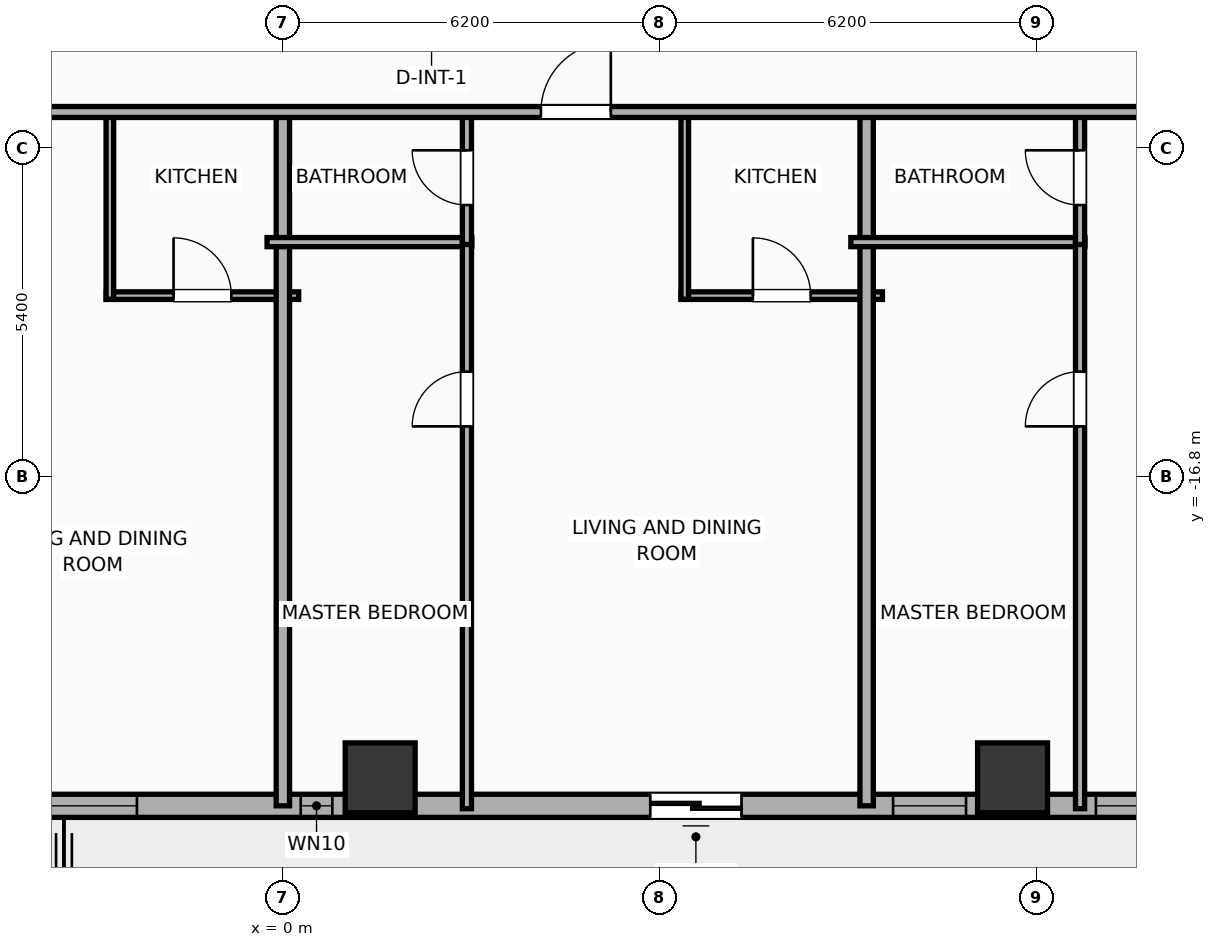
"""IFC4 building model, lengths in metres.
Left out: names, types, materials, properties, quantities, classifications, styles, units other than length and angle.
Written with IfcOpenShell. Run it as: python <this file> out.ifc"""

import sys

from ifc_helpers import new_model, si_unit, direction, frame, frame_2d, origin, origin_2d, place, context, subcontext, project, spatial, rectangle, hollow_rectangle, extrude, element, fill, save


model = new_model("IFC4")
c1 = context("Model", 3, precision=1e-05, world=origin(), true_north=direction((0.0, 1.0)))
c2 = subcontext(c1, "Body", "Model", "MODEL_VIEW")
j1 = project(units=[si_unit("LENGTHUNIT", "METRE"), si_unit("PLANEANGLEUNIT", "RADIAN")], contexts=[c1])
p1 = place(None, origin())
s1 = spatial("IfcSite", under=j1, at=p1, CompositionType="ELEMENT")
p2 = place(p1, origin())
s2 = spatial("IfcBuilding", under=s1, at=p2, CompositionType="ELEMENT")
p3 = place(p2, frame((0.0, 0.0, 53.3)))
s3 = spatial("IfcBuildingStorey", under=s2, at=p3, CompositionType="ELEMENT", Elevation=53.3)
for number, where, z_axis, x_axis in (
    (1, (1.6, -21.75, 0.0), (0.0, 0.0, 1.0), (1.0, 0.0, 0.0)),
    (2, (12.0, -21.75, 0.0), (0.0, 0.0, 1.0), (1.0, 0.0, 0.0)),
):
    element("IfcColumn", number, at=place(p3, frame(where, z_axis=z_axis, x_axis=x_axis)), inside=s3, PredefinedType="COLUMN", context=c2, shape_type="SweptSolid", body=[
        extrude(hollow_rectangle(XDim=1.15, YDim=1.15, WallThickness=0.04, at=origin_2d()), origin(), (0.0, 0.0, 1.0), 3.9),
    ])
p4 = place(p3, frame((22.381, -22.21, 0.0), z_axis=(0.0, 0.0, 1.0), x_axis=(-1.0, 0.0, 0.0)))
e3 = element("IfcWall", 3, at=p4, inside=s3, PredefinedType="ELEMENTEDWALL", context=c2, shape_type="SweptSolid", body=[
    extrude(rectangle(XDim=51.963, YDim=0.38, at=frame_2d((25.981, 0.0))), origin(), (0.0, 0.0, 1.0), 3.65),
])
p5 = place(p4, frame((14.839, 0.0, 0.0)))
e4 = element("IfcOpeningElement", 4, at=p5, cuts=e3, PredefinedType="OPENING", context=c2, shape_type="SweptSolid", body=[
    extrude(rectangle(XDim=1.5, YDim=2.05, at=frame_2d((0.75, 1.025))), frame((0.0, 0.2, 0.0), z_axis=(0.0, -1.0, 0.0), x_axis=(1.0, 0.0, 0.0)), (0.0, 0.0, 1.0), 0.4),
])
p6 = place(p4, frame((6.61, 0.0, 0.75)))
e5 = element("IfcOpeningElement", 5, at=p6, cuts=e3, PredefinedType="OPENING", context=c2, shape_type="SweptSolid", body=[
    extrude(rectangle(XDim=2.4, YDim=2.1, at=frame_2d((1.2, 1.05))), frame((0.0, 0.2, 0.0), z_axis=(0.0, -1.0, 0.0), x_axis=(1.0, 0.0, 0.0)), (0.0, 0.0, 1.0), 0.4),
])
p7 = place(p4, frame((24.781, 0.0, 0.75)))
e6 = element("IfcOpeningElement", 6, at=p7, cuts=e3, PredefinedType="OPENING", context=c2, shape_type="SweptSolid", body=[
    extrude(rectangle(XDim=2.4, YDim=2.1, at=frame_2d((1.2, 1.05))), frame((0.0, 0.2, 0.0), z_axis=(0.0, -1.0, 0.0), x_axis=(1.0, 0.0, 0.0)), (0.0, 0.0, 1.0), 0.4),
])
p8 = place(p4, frame((49.281, 0.0, 0.75)))
e7 = element("IfcOpeningElement", 7, at=p8, cuts=e3, PredefinedType="OPENING", context=c2, shape_type="SweptSolid", body=[
    extrude(rectangle(XDim=1.2, YDim=2.05, at=frame_2d((0.6, 1.025))), frame((0.0, 0.2, 0.0), z_axis=(0.0, -1.0, 0.0), x_axis=(1.0, 0.0, 0.0)), (0.0, 0.0, 1.0), 0.4),
])
p9 = place(p4, frame((46.241, 0.0, 0.75)))
e8 = element("IfcOpeningElement", 8, at=p9, cuts=e3, PredefinedType="OPENING", context=c2, shape_type="SweptSolid", body=[
    extrude(rectangle(XDim=1.2, YDim=2.05, at=frame_2d((0.6, 1.025))), frame((0.0, 0.2, 0.0), z_axis=(0.0, -1.0, 0.0), x_axis=(1.0, 0.0, 0.0)), (0.0, 0.0, 1.0), 0.4),
])
p10 = place(p4, frame((42.686, 0.0, 0.75)))
e9 = element("IfcOpeningElement", 9, at=p10, cuts=e3, PredefinedType="OPENING", context=c2, shape_type="SweptSolid", body=[
    extrude(rectangle(XDim=1.2, YDim=2.05, at=frame_2d((0.6, 1.025))), frame((0.0, 0.2, 0.0), z_axis=(0.0, -1.0, 0.0), x_axis=(1.0, 0.0, 0.0)), (0.0, 0.0, 1.0), 0.4),
])
p11 = place(p4, frame((39.548, 0.0, 0.75)))
e10 = element("IfcOpeningElement", 10, at=p11, cuts=e3, PredefinedType="OPENING", context=c2, shape_type="SweptSolid", body=[
    extrude(rectangle(XDim=1.2, YDim=2.05, at=frame_2d((0.6, 1.025))), frame((0.0, 0.2, 0.0), z_axis=(0.0, -1.0, 0.0), x_axis=(1.0, 0.0, 0.0)), (0.0, 0.0, 1.0), 0.4),
])
p12 = place(p4, frame((34.748, 0.0, 0.75)))
e11 = element("IfcOpeningElement", 11, at=p12, cuts=e3, PredefinedType="OPENING", context=c2, shape_type="SweptSolid", body=[
    extrude(rectangle(XDim=1.2, YDim=2.05, at=frame_2d((0.6, 1.025))), frame((0.0, 0.2, 0.0), z_axis=(0.0, -1.0, 0.0), x_axis=(1.0, 0.0, 0.0)), (0.0, 0.0, 1.0), 0.4),
])
p13 = place(p4, frame((29.226, 0.0, 0.75)))
e12 = element("IfcOpeningElement", 12, at=p13, cuts=e3, PredefinedType="OPENING", context=c2, shape_type="SweptSolid", body=[
    extrude(rectangle(XDim=1.2, YDim=2.05, at=frame_2d((0.6, 1.025))), frame((0.0, 0.2, 0.0), z_axis=(0.0, -1.0, 0.0), x_axis=(1.0, 0.0, 0.0)), (0.0, 0.0, 1.0), 0.4),
])
p14 = place(p4, frame((21.568, 0.0, 0.75)))
e13 = element("IfcOpeningElement", 13, at=p14, cuts=e3, PredefinedType="OPENING", context=c2, shape_type="SweptSolid", body=[
    extrude(rectangle(XDim=0.52, YDim=2.05, at=frame_2d((0.26, 1.025))), frame((0.0, 0.2, 0.0), z_axis=(0.0, -1.0, 0.0), x_axis=(1.0, 0.0, 0.0)), (0.0, 0.0, 1.0), 0.4),
])
p15 = place(p4, frame((11.146, 0.0, 0.75)))
e14 = element("IfcOpeningElement", 14, at=p15, cuts=e3, PredefinedType="OPENING", context=c2, shape_type="SweptSolid", body=[
    extrude(rectangle(XDim=1.2, YDim=2.05, at=frame_2d((0.6, 1.025))), frame((0.0, 0.2, 0.0), z_axis=(0.0, -1.0, 0.0), x_axis=(1.0, 0.0, 0.0)), (0.0, 0.0, 1.0), 0.4),
])
p16 = place(p4, frame((1.436, 0.0, 0.75)))
e15 = element("IfcOpeningElement", 15, at=p16, cuts=e3, PredefinedType="OPENING", context=c2, shape_type="SweptSolid", body=[
    extrude(rectangle(XDim=1.2, YDim=2.05, at=frame_2d((0.6, 1.025))), frame((0.0, 0.2, 0.0), z_axis=(0.0, -1.0, 0.0), x_axis=(1.0, 0.0, 0.0)), (0.0, 0.0, 1.0), 0.4),
])
p17 = place(p3, frame((-2.905, -13.82, 0.0), z_axis=(0.0, 0.0, 1.0), x_axis=(1.0, 0.0, 0.0)))
e16 = element("IfcWall", 16, at=p17, inside=s3, PredefinedType="PARTITIONING", context=c2, shape_type="SweptSolid", body=[
    extrude(rectangle(XDim=3.165, YDim=0.125, at=frame_2d((1.583, 0.0))), origin(), (0.0, 0.0, 1.0), 3.65),
])
p18 = place(p17, frame((1.107, 0.0, 0.0)))
e17 = element("IfcOpeningElement", 17, at=p18, cuts=e16, PredefinedType="OPENING", context=c2, shape_type="SweptSolid", body=[
    extrude(rectangle(XDim=0.95, YDim=2.05, at=frame_2d((0.475, 1.025))), frame((0.0, 0.073, 0.0), z_axis=(0.0, -1.0, 0.0), x_axis=(1.0, 0.0, 0.0)), (0.0, 0.0, 1.0), 0.145),
])
p19 = place(p3, frame((-2.845, -13.88, 0.0), z_axis=(0.0, 0.0, 1.0), x_axis=(0.0, 1.0, 0.0)))
e18 = element("IfcWall", 18, at=p19, inside=s3, PredefinedType="PARTITIONING", context=c2, shape_type="SweptSolid", body=[
    extrude(rectangle(XDim=3.1, YDim=0.125, at=frame_2d((1.55, 0.0))), origin(), (0.0, 0.0, 1.0), 3.65),
])
p20 = place(p3, frame((0.0, -22.21, 0.0), z_axis=(0.0, 0.0, 1.0), x_axis=(0.0, 1.0, 0.0)))
e19 = element("IfcWall", 19, at=p20, inside=s3, PredefinedType="PARTITIONING", context=c2, shape_type="SweptSolid", body=[
    extrude(rectangle(XDim=11.49, YDim=0.22, at=frame_2d((5.745, 0.0))), origin(), (0.0, 0.0, 1.0), 3.65),
])
p21 = place(p3, frame((-0.26, -12.94, 0.0), z_axis=(0.0, 0.0, 1.0), x_axis=(1.0, 0.0, 0.0)))
e20 = element("IfcWall", 20, at=p21, inside=s3, PredefinedType="PLUMBINGWALL", context=c2, shape_type="SweptSolid", body=[
    extrude(rectangle(XDim=3.367, YDim=0.15, at=frame_2d((1.684, 0.0))), origin(), (0.0, 0.0, 1.0), 3.65),
])
p22 = place(p3, frame((3.027, -22.258, 0.0), z_axis=(0.0, 0.0, 1.0), x_axis=(0.0, 1.0, 0.0)))
e21 = element("IfcWall", 21, at=p22, inside=s3, PredefinedType="PLUMBINGWALL", context=c2, shape_type="SweptSolid", body=[
    extrude(rectangle(XDim=9.358, YDim=0.15, at=frame_2d((4.679, 0.0))), origin(), (0.0, 0.0, 1.0), 2.94),
])
p23 = place(p22, frame((6.288, 0.0, 0.0)))
e22 = element("IfcOpeningElement", 22, at=p23, cuts=e21, PredefinedType="OPENING", context=c2, shape_type="SweptSolid", body=[
    extrude(rectangle(XDim=0.9, YDim=2.05, at=frame_2d((0.45, 1.025))), frame((0.0, 0.085, 0.0), z_axis=(0.0, -1.0, 0.0), x_axis=(1.0, 0.0, 0.0)), (0.0, 0.0, 1.0), 0.17),
])
p24 = place(p3, frame((3.027, -12.98, 0.0), z_axis=(0.0, 0.0, 1.0), x_axis=(0.0, 1.0, 0.0)))
e23 = element("IfcWall", 23, at=p24, inside=s3, PredefinedType="PLUMBINGWALL", context=c2, shape_type="SweptSolid", body=[
    extrude(rectangle(XDim=2.2, YDim=0.15, at=frame_2d((1.1, 0.0))), origin(), (0.0, 0.0, 1.0), 2.94),
])
p25 = place(p24, frame((0.65, 0.0, 0.0)))
e24 = element("IfcOpeningElement", 24, at=p25, cuts=e23, PredefinedType="OPENING", context=c2, shape_type="SweptSolid", body=[
    extrude(rectangle(XDim=0.9, YDim=2.05, at=frame_2d((0.45, 1.025))), frame((0.0, 0.085, 0.0), z_axis=(0.0, -1.0, 0.0), x_axis=(1.0, 0.0, 0.0)), (0.0, 0.0, 1.0), 0.17),
])
p26 = place(p3, frame((6.549, -13.82, 0.0), z_axis=(0.0, 0.0, 1.0), x_axis=(1.0, 0.0, 0.0)))
e25 = element("IfcWall", 25, at=p26, inside=s3, PredefinedType="PARTITIONING", context=c2, shape_type="SweptSolid", body=[
    extrude(rectangle(XDim=3.311, YDim=0.125, at=frame_2d((1.656, 0.0))), origin(), (0.0, 0.0, 1.0), 3.65),
])
p27 = place(p26, frame((1.18, 0.0, 0.0)))
e26 = element("IfcOpeningElement", 26, at=p27, cuts=e25, PredefinedType="OPENING", context=c2, shape_type="SweptSolid", body=[
    extrude(rectangle(XDim=0.95, YDim=2.05, at=frame_2d((0.475, 1.025))), frame((0.0, 0.073, 0.0), z_axis=(0.0, -1.0, 0.0), x_axis=(1.0, 0.0, 0.0)), (0.0, 0.0, 1.0), 0.145),
])
p28 = place(p3, frame((6.609, -13.88, 0.0), z_axis=(0.0, 0.0, 1.0), x_axis=(0.0, 1.0, 0.0)))
e27 = element("IfcWall", 27, at=p28, inside=s3, PredefinedType="PARTITIONING", context=c2, shape_type="SweptSolid", body=[
    extrude(rectangle(XDim=3.1, YDim=0.125, at=frame_2d((1.55, 0.0))), origin(), (0.0, 0.0, 1.0), 3.65),
])
p29 = place(p3, frame((9.6, -22.21, 0.0), z_axis=(0.0, 0.0, 1.0), x_axis=(0.0, 1.0, 0.0)))
e28 = element("IfcWall", 28, at=p29, inside=s3, PredefinedType="PARTITIONING", context=c2, shape_type="SweptSolid", body=[
    extrude(rectangle(XDim=11.49, YDim=0.22, at=frame_2d((5.745, 0.0))), origin(), (0.0, 0.0, 1.0), 3.65),
])
p30 = place(p3, frame((9.34, -12.94, 0.0), z_axis=(0.0, 0.0, 1.0), x_axis=(1.0, 0.0, 0.0)))
e29 = element("IfcWall", 29, at=p30, inside=s3, PredefinedType="PLUMBINGWALL", context=c2, shape_type="SweptSolid", body=[
    extrude(rectangle(XDim=3.85, YDim=0.15, at=frame_2d((1.925, 0.0))), origin(), (0.0, 0.0, 1.0), 3.65),
])
p31 = place(p3, frame((13.11, -22.258, 0.0), z_axis=(0.0, 0.0, 1.0), x_axis=(0.0, 1.0, 0.0)))
e30 = element("IfcWall", 30, at=p31, inside=s3, PredefinedType="PLUMBINGWALL", context=c2, shape_type="SweptSolid", body=[
    extrude(rectangle(XDim=9.358, YDim=0.15, at=frame_2d((4.679, 0.0))), origin(), (0.0, 0.0, 1.0), 3.65),
])
p32 = place(p31, frame((6.288, 0.0, 0.0)))
e31 = element("IfcOpeningElement", 31, at=p32, cuts=e30, PredefinedType="OPENING", context=c2, shape_type="SweptSolid", body=[
    extrude(rectangle(XDim=0.9, YDim=2.05, at=frame_2d((0.45, 1.025))), frame((0.0, 0.085, 0.0), z_axis=(0.0, -1.0, 0.0), x_axis=(1.0, 0.0, 0.0)), (0.0, 0.0, 1.0), 0.17),
])
p33 = place(p3, frame((13.11, -12.98, 0.0), z_axis=(0.0, 0.0, 1.0), x_axis=(0.0, 1.0, 0.0)))
e32 = element("IfcWall", 32, at=p33, inside=s3, PredefinedType="PLUMBINGWALL", context=c2, shape_type="SweptSolid", body=[
    extrude(rectangle(XDim=2.2, YDim=0.15, at=frame_2d((1.1, 0.0))), origin(), (0.0, 0.0, 1.0), 3.65),
])
p34 = place(p33, frame((0.65, 0.0, 0.0)))
e33 = element("IfcOpeningElement", 33, at=p34, cuts=e32, PredefinedType="OPENING", context=c2, shape_type="SweptSolid", body=[
    extrude(rectangle(XDim=0.9, YDim=2.05, at=frame_2d((0.45, 1.025))), frame((0.0, 0.085, 0.0), z_axis=(0.0, -1.0, 0.0), x_axis=(1.0, 0.0, 0.0)), (0.0, 0.0, 1.0), 0.17),
])
p35 = place(p3, frame((-33.41, -10.8, 0.0), z_axis=(0.0, 0.0, 1.0), x_axis=(1.0, 0.0, 0.0)))
e34 = element("IfcWall", 34, at=p35, inside=s3, PredefinedType="PARTITIONING", context=c2, shape_type="SweptSolid", body=[
    extrude(rectangle(XDim=59.62, YDim=0.18, at=frame_2d((29.81, 0.0))), origin(), (0.0, 0.0, 1.0), 3.65),
])
p36 = place(p35, frame((3.104, 0.0, 0.0)))
e35 = element("IfcOpeningElement", 35, at=p36, cuts=e34, PredefinedType="OPENING", context=c2, shape_type="SweptSolid", body=[
    extrude(rectangle(XDim=1.15, YDim=2.05, at=frame_2d((0.575, 1.025))), frame((0.0, 0.1, 0.0), z_axis=(0.0, -1.0, 0.0), x_axis=(1.0, 0.0, 0.0)), (0.0, 0.0, 1.0), 0.2),
])
p37 = place(p35, frame((10.246, 0.0, 0.0)))
e36 = element("IfcOpeningElement", 36, at=p37, cuts=e34, PredefinedType="OPENING", context=c2, shape_type="SweptSolid", body=[
    extrude(rectangle(XDim=1.15, YDim=2.05, at=frame_2d((0.575, 1.025))), frame((0.0, 0.1, 0.0), z_axis=(0.0, -1.0, 0.0), x_axis=(1.0, 0.0, 0.0)), (0.0, 0.0, 1.0), 0.2),
])
p38 = place(p35, frame((18.336, 0.0, 0.0)))
e37 = element("IfcOpeningElement", 37, at=p38, cuts=e34, PredefinedType="OPENING", context=c2, shape_type="SweptSolid", body=[
    extrude(rectangle(XDim=1.15, YDim=2.05, at=frame_2d((0.575, 1.025))), frame((0.0, 0.1, 0.0), z_axis=(0.0, -1.0, 0.0), x_axis=(1.0, 0.0, 0.0)), (0.0, 0.0, 1.0), 0.2),
])
p39 = place(p35, frame((28.287, 0.0, 0.0)))
e38 = element("IfcOpeningElement", 38, at=p39, cuts=e34, PredefinedType="OPENING", context=c2, shape_type="SweptSolid", body=[
    extrude(rectangle(XDim=1.15, YDim=2.05, at=frame_2d((0.575, 1.025))), frame((0.0, 0.1, 0.0), z_axis=(0.0, -1.0, 0.0), x_axis=(1.0, 0.0, 0.0)), (0.0, 0.0, 1.0), 0.2),
])
p40 = place(p35, frame((37.653, 0.0, 0.0)))
e39 = element("IfcOpeningElement", 39, at=p40, cuts=e34, PredefinedType="OPENING", context=c2, shape_type="SweptSolid", body=[
    extrude(rectangle(XDim=1.15, YDim=2.05, at=frame_2d((0.575, 1.025))), frame((0.0, 0.1, 0.0), z_axis=(0.0, -1.0, 0.0), x_axis=(1.0, 0.0, 0.0)), (0.0, 0.0, 1.0), 0.2),
])
p41 = place(p35, frame((47.604, 0.0, 0.0)))
e40 = element("IfcOpeningElement", 40, at=p41, cuts=e34, PredefinedType="OPENING", context=c2, shape_type="SweptSolid", body=[
    extrude(rectangle(XDim=1.15, YDim=2.05, at=frame_2d((0.575, 1.025))), frame((0.0, 0.1, 0.0), z_axis=(0.0, -1.0, 0.0), x_axis=(1.0, 0.0, 0.0)), (0.0, 0.0, 1.0), 0.2),
])
p42 = place(p35, frame((55.736, 0.0, 0.0)))
e41 = element("IfcOpeningElement", 41, at=p42, cuts=e34, PredefinedType="OPENING", context=c2, shape_type="SweptSolid", body=[
    extrude(rectangle(XDim=1.15, YDim=2.05, at=frame_2d((0.575, 1.025))), frame((0.0, 0.1, 0.0), z_axis=(0.0, -1.0, 0.0), x_axis=(1.0, 0.0, 0.0)), (0.0, 0.0, 1.0), 0.2),
])
p43 = place(p5, origin())
e42 = element("IfcDoor", 42, at=p43, inside=s3, OperationType="SLIDING_TO_RIGHT", PredefinedType="DOOR", context=c2, shape_type="SweptSolid", body=[
    extrude(rectangle(XDim=1.5, YDim=2.05, at=frame_2d((0.75, 1.025))), frame((0.0, 0.025, 0.0), z_axis=(0.0, -1.0, 0.0), x_axis=(1.0, 0.0, 0.0)), (0.0, 0.0, 1.0), 0.05),
])
fill(e4, e42)
p44 = place(p6, origin())
e43 = element("IfcWindow", 43, at=p44, inside=s3, PartitioningType="SINGLE_PANEL", PredefinedType="WINDOW", context=c2, shape_type="SweptSolid", body=[
    extrude(rectangle(XDim=2.4, YDim=2.1, at=frame_2d((1.2, 1.05))), frame((0.0, 0.03, 0.0), z_axis=(0.0, -1.0, 0.0), x_axis=(1.0, 0.0, 0.0)), (0.0, 0.0, 1.0), 0.06),
])
fill(e5, e43)
p45 = place(p7, origin())
e44 = element("IfcWindow", 44, at=p45, inside=s3, PartitioningType="SINGLE_PANEL", PredefinedType="WINDOW", context=c2, shape_type="SweptSolid", body=[
    extrude(rectangle(XDim=2.4, YDim=2.1, at=frame_2d((1.2, 1.05))), frame((0.0, 0.03, 0.0), z_axis=(0.0, -1.0, 0.0), x_axis=(1.0, 0.0, 0.0)), (0.0, 0.0, 1.0), 0.06),
])
fill(e6, e44)
p46 = place(p14, origin())
e45 = element("IfcWindow", 45, at=p46, inside=s3, PartitioningType="SINGLE_PANEL", PredefinedType="WINDOW", context=c2, shape_type="SweptSolid", body=[
    extrude(rectangle(XDim=0.52, YDim=2.05, at=frame_2d((0.26, 1.025))), frame((0.0, 0.03, 0.0), z_axis=(0.0, -1.0, 0.0), x_axis=(1.0, 0.0, 0.0)), (0.0, 0.0, 1.0), 0.06),
])
fill(e13, e45)
p47 = place(p15, origin())
e46 = element("IfcWindow", 46, at=p47, inside=s3, PartitioningType="SINGLE_PANEL", PredefinedType="WINDOW", context=c2, shape_type="SweptSolid", body=[
    extrude(rectangle(XDim=1.2, YDim=2.05, at=frame_2d((0.6, 1.025))), frame((0.0, 0.03, 0.0), z_axis=(0.0, -1.0, 0.0), x_axis=(1.0, 0.0, 0.0)), (0.0, 0.0, 1.0), 0.06),
])
fill(e14, e46)
p48 = place(p18, origin())
e47 = element("IfcDoor", 47, at=p48, inside=s3, OperationType="SINGLE_SWING_LEFT", PredefinedType="DOOR", context=c2, shape_type="SweptSolid", body=[
    extrude(rectangle(XDim=0.95, YDim=2.05, at=frame_2d((0.475, 1.025))), frame((0.0, 0.025, 0.0), z_axis=(0.0, -1.0, 0.0), x_axis=(1.0, 0.0, 0.0)), (0.0, 0.0, 1.0), 0.05),
])
fill(e17, e47)
p49 = place(p23, origin())
e48 = element("IfcDoor", 48, at=p49, inside=s3, OperationType="SINGLE_SWING_LEFT", PredefinedType="DOOR", context=c2, shape_type="SweptSolid", body=[
    extrude(rectangle(XDim=0.9, YDim=2.05, at=frame_2d((0.45, 1.025))), frame((0.0, 0.025, 0.0), z_axis=(0.0, -1.0, 0.0), x_axis=(1.0, 0.0, 0.0)), (0.0, 0.0, 1.0), 0.05),
])
fill(e22, e48)
p50 = place(p25, origin())
e49 = element("IfcDoor", 49, at=p50, inside=s3, OperationType="SINGLE_SWING_RIGHT", PredefinedType="DOOR", context=c2, shape_type="SweptSolid", body=[
    extrude(rectangle(XDim=0.9, YDim=2.05, at=frame_2d((0.45, 1.025))), frame((0.0, 0.025, 0.0), z_axis=(0.0, -1.0, 0.0), x_axis=(1.0, 0.0, 0.0)), (0.0, 0.0, 1.0), 0.05),
])
fill(e24, e49)
p51 = place(p27, origin())
e50 = element("IfcDoor", 50, at=p51, inside=s3, OperationType="SINGLE_SWING_LEFT", PredefinedType="DOOR", context=c2, shape_type="SweptSolid", body=[
    extrude(rectangle(XDim=0.95, YDim=2.05, at=frame_2d((0.475, 1.025))), frame((0.0, 0.025, 0.0), z_axis=(0.0, -1.0, 0.0), x_axis=(1.0, 0.0, 0.0)), (0.0, 0.0, 1.0), 0.05),
])
fill(e26, e50)
p52 = place(p32, origin())
e51 = element("IfcDoor", 51, at=p52, inside=s3, OperationType="SINGLE_SWING_LEFT", PredefinedType="DOOR", context=c2, shape_type="SweptSolid", body=[
    extrude(rectangle(XDim=0.9, YDim=2.05, at=frame_2d((0.45, 1.025))), frame((0.0, 0.025, 0.0), z_axis=(0.0, -1.0, 0.0), x_axis=(1.0, 0.0, 0.0)), (0.0, 0.0, 1.0), 0.05),
])
fill(e31, e51)
p53 = place(p34, origin())
e52 = element("IfcDoor", 52, at=p53, inside=s3, OperationType="SINGLE_SWING_RIGHT", PredefinedType="DOOR", context=c2, shape_type="SweptSolid", body=[
    extrude(rectangle(XDim=0.9, YDim=2.05, at=frame_2d((0.45, 1.025))), frame((0.0, 0.025, 0.0), z_axis=(0.0, -1.0, 0.0), x_axis=(1.0, 0.0, 0.0)), (0.0, 0.0, 1.0), 0.05),
])
fill(e33, e52)
p54 = place(p40, origin())
e53 = element("IfcDoor", 53, at=p54, inside=s3, OperationType="SINGLE_SWING_RIGHT", PredefinedType="DOOR", context=c2, shape_type="SweptSolid", body=[
    extrude(rectangle(XDim=1.15, YDim=2.05, at=frame_2d((0.575, 1.025))), frame((0.0, 0.025, 0.0), z_axis=(0.0, -1.0, 0.0), x_axis=(1.0, 0.0, 0.0)), (0.0, 0.0, 1.0), 0.05),
])
fill(e39, e53)
save(model, sys.argv[1])
